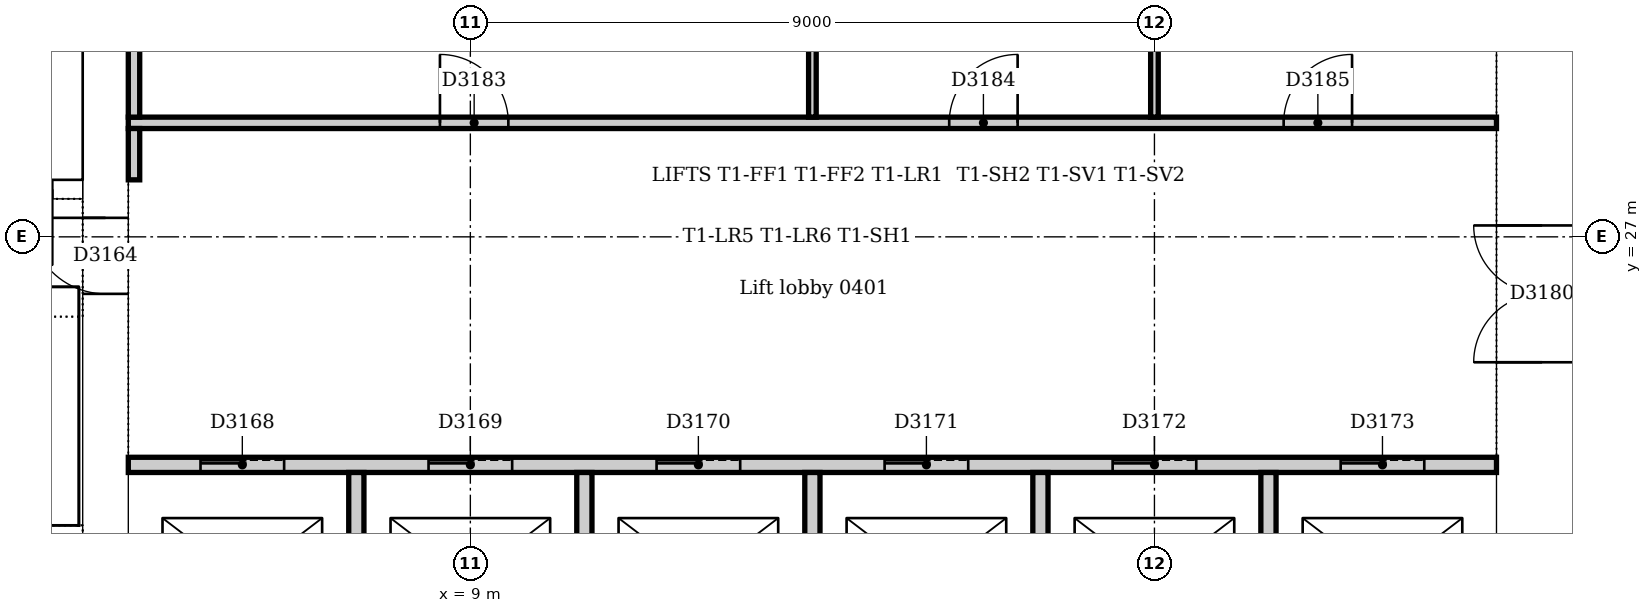
"""IFC4 building model, lengths in metres.
Left out: names, types, materials, properties, quantities, classifications, styles, units other than length and angle.
Written with IfcOpenShell. Run it as: python <this file> out.ifc"""

import sys

from ifc_helpers import new_model, si_unit, direction, frame, frame_2d, origin, place, context, subcontext, project, spatial, rectangle, extrude, element, fill, save


model = new_model("IFC4")
c1 = context("Model", 3, precision=1e-05, world=origin(), true_north=direction((0.0, 1.0)))
c2 = subcontext(c1, "Body", "Model", "MODEL_VIEW")
j1 = project(units=[si_unit("LENGTHUNIT", "METRE"), si_unit("PLANEANGLEUNIT", "RADIAN")], contexts=[c1])
p1 = place(None, origin())
s1 = spatial("IfcSite", under=j1, at=p1, CompositionType="ELEMENT")
p2 = place(p1, origin())
s2 = spatial("IfcBuilding", under=s1, at=p2, CompositionType="ELEMENT")
p3 = place(p2, frame((0.0, 0.0, 21.0)))
s3 = spatial("IfcBuildingStorey", under=s2, at=p3, CompositionType="ELEMENT", Elevation=21.0)
p4 = place(p3, frame((23.1, 21.0, 0.0), z_axis=(0.0, 0.0, 1.0), x_axis=(0.0, 1.0, 0.0)))
e1 = element("IfcWall", 1, at=p4, inside=s3, PredefinedType="SOLIDWALL", context=c2, shape_type="SweptSolid", body=[
    extrude(rectangle(XDim=10.5, YDim=1.2, at=frame_2d((5.25, 0.0))), origin(), (0.0, 0.0, 1.0), 5.0),
])
p5 = place(p4, frame((4.35, 0.0, 0.0)))
e2 = element("IfcOpeningElement", 2, at=p5, cuts=e1, PredefinedType="OPENING", context=c2, shape_type="SweptSolid", body=[
    extrude(rectangle(XDim=1.8, YDim=2.1, at=frame_2d((0.9, 1.05))), frame((0.0, 0.61, 0.0), z_axis=(0.0, -1.0, 0.0), x_axis=(1.0, 0.0, 0.0)), (0.0, 0.0, 1.0), 1.22),
])
p6 = place(p3, frame((4.2, 31.5, 0.0), z_axis=(0.0, 0.0, 1.0), x_axis=(0.0, -1.0, 0.0)))
e3 = element("IfcWall", 3, at=p6, inside=s3, PredefinedType="SOLIDWALL", context=c2, shape_type="SweptSolid", body=[
    extrude(rectangle(XDim=10.5, YDim=0.6, at=frame_2d((5.25, 0.0))), origin(), (0.0, 0.0, 1.0), 5.0),
])
p7 = place(p6, frame((4.25, 0.0, 0.0)))
e4 = element("IfcOpeningElement", 4, at=p7, cuts=e3, PredefinedType="OPENING", context=c2, shape_type="SweptSolid", body=[
    extrude(rectangle(XDim=1.0, YDim=2.1, at=frame_2d((0.5, 1.05))), frame((0.0, 0.31, 0.0), z_axis=(0.0, -1.0, 0.0), x_axis=(1.0, 0.0, 0.0)), (0.0, 0.0, 1.0), 0.62),
])
p8 = place(p3, frame((3.9, 27.625, 0.0), z_axis=(0.0, 0.0, 1.0), x_axis=(-1.0, 0.0, 0.0)))
e5 = element("IfcWall", 5, at=p8, inside=s3, PredefinedType="SOLIDWALL", context=c2, shape_type="SweptSolid", body=[
    extrude(rectangle(XDim=3.54, YDim=0.25, at=frame_2d((1.77, 0.0))), origin(), (0.0, 0.0, 1.0), 5.0),
])
p9 = place(p8, frame((0.4, 0.0, 0.0)))
e6 = element("IfcOpeningElement", 6, at=p9, cuts=e5, PredefinedType="OPENING", context=c2, shape_type="SweptSolid", body=[
    extrude(rectangle(XDim=1.0, YDim=2.1, at=frame_2d((0.5, 1.05))), frame((0.0, 0.135, 0.0), z_axis=(0.0, -1.0, 0.0), x_axis=(1.0, 0.0, 0.0)), (0.0, 0.0, 1.0), 0.27),
])
p10 = place(p3, frame((4.5, 24.0, 0.0), z_axis=(0.0, 0.0, 1.0), x_axis=(1.0, 0.0, 0.0)))
e7 = element("IfcWall", 7, at=p10, inside=s3, PredefinedType="PARTITIONING", context=c2, shape_type="SweptSolid", body=[
    extrude(rectangle(XDim=18.0, YDim=0.2, at=frame_2d((9.0, 0.0))), origin(), (0.0, 0.0, 1.0), 4.85),
])
p11 = place(p10, frame((0.95, 0.0, 0.0)))
e8 = element("IfcOpeningElement", 8, at=p11, cuts=e7, PredefinedType="OPENING", context=c2, shape_type="SweptSolid", body=[
    extrude(rectangle(XDim=1.1, YDim=2.1, at=frame_2d((0.55, 1.05))), frame((0.0, 0.11, 0.0), z_axis=(0.0, -1.0, 0.0), x_axis=(1.0, 0.0, 0.0)), (0.0, 0.0, 1.0), 0.22),
])
p12 = place(p10, frame((3.95, 0.0, 0.0)))
e9 = element("IfcOpeningElement", 9, at=p12, cuts=e7, PredefinedType="OPENING", context=c2, shape_type="SweptSolid", body=[
    extrude(rectangle(XDim=1.1, YDim=2.1, at=frame_2d((0.55, 1.05))), frame((0.0, 0.11, 0.0), z_axis=(0.0, -1.0, 0.0), x_axis=(1.0, 0.0, 0.0)), (0.0, 0.0, 1.0), 0.22),
])
p13 = place(p10, frame((6.95, 0.0, 0.0)))
e10 = element("IfcOpeningElement", 10, at=p13, cuts=e7, PredefinedType="OPENING", context=c2, shape_type="SweptSolid", body=[
    extrude(rectangle(XDim=1.1, YDim=2.1, at=frame_2d((0.55, 1.05))), frame((0.0, 0.11, 0.0), z_axis=(0.0, -1.0, 0.0), x_axis=(1.0, 0.0, 0.0)), (0.0, 0.0, 1.0), 0.22),
])
p14 = place(p10, frame((9.95, 0.0, 0.0)))
e11 = element("IfcOpeningElement", 11, at=p14, cuts=e7, PredefinedType="OPENING", context=c2, shape_type="SweptSolid", body=[
    extrude(rectangle(XDim=1.1, YDim=2.1, at=frame_2d((0.55, 1.05))), frame((0.0, 0.11, 0.0), z_axis=(0.0, -1.0, 0.0), x_axis=(1.0, 0.0, 0.0)), (0.0, 0.0, 1.0), 0.22),
])
p15 = place(p10, frame((12.95, 0.0, 0.0)))
e12 = element("IfcOpeningElement", 12, at=p15, cuts=e7, PredefinedType="OPENING", context=c2, shape_type="SweptSolid", body=[
    extrude(rectangle(XDim=1.1, YDim=2.1, at=frame_2d((0.55, 1.05))), frame((0.0, 0.11, 0.0), z_axis=(0.0, -1.0, 0.0), x_axis=(1.0, 0.0, 0.0)), (0.0, 0.0, 1.0), 0.22),
])
p16 = place(p10, frame((15.95, 0.0, 0.0)))
e13 = element("IfcOpeningElement", 13, at=p16, cuts=e7, PredefinedType="OPENING", context=c2, shape_type="SweptSolid", body=[
    extrude(rectangle(XDim=1.1, YDim=2.1, at=frame_2d((0.55, 1.05))), frame((0.0, 0.11, 0.0), z_axis=(0.0, -1.0, 0.0), x_axis=(1.0, 0.0, 0.0)), (0.0, 0.0, 1.0), 0.22),
])
for number, where, z_axis, x_axis in (
    (14, (7.5, 21.0, 0.0), (0.0, 0.0, 1.0), (0.0, 1.0, 0.0)),
    (15, (10.5, 21.0, 0.0), (0.0, 0.0, 1.0), (0.0, 1.0, 0.0)),
    (16, (13.5, 21.0, 0.0), (0.0, 0.0, 1.0), (0.0, 1.0, 0.0)),
    (17, (16.5, 21.0, 0.0), (0.0, 0.0, 1.0), (0.0, 1.0, 0.0)),
    (18, (19.5, 21.0, 0.0), (0.0, 0.0, 1.0), (0.0, 1.0, 0.0)),
):
    element("IfcWall", number, at=place(p3, frame(where, z_axis=z_axis, x_axis=x_axis)), inside=s3, PredefinedType="PARTITIONING", context=c2, shape_type="SweptSolid", body=[
        extrude(rectangle(XDim=2.9, YDim=0.2, at=frame_2d((1.45, 0.0))), origin(), (0.0, 0.0, 1.0), 4.85),
    ])
p17 = place(p3, frame((4.5, 28.5, 0.0), z_axis=(0.0, 0.0, 1.0), x_axis=(1.0, 0.0, 0.0)))
e19 = element("IfcWall", 19, at=p17, inside=s3, PredefinedType="PARTITIONING", context=c2, shape_type="SweptSolid", body=[
    extrude(rectangle(XDim=18.0, YDim=0.15, at=frame_2d((9.0, 0.0))), origin(), (0.0, 0.0, 1.0), 4.85),
])
p18 = place(p17, frame((4.1, 0.0, 0.0)))
e20 = element("IfcOpeningElement", 20, at=p18, cuts=e19, PredefinedType="OPENING", context=c2, shape_type="SweptSolid", body=[
    extrude(rectangle(XDim=0.9, YDim=2.1, at=frame_2d((0.45, 1.05))), frame((0.0, 0.085, 0.0), z_axis=(0.0, -1.0, 0.0), x_axis=(1.0, 0.0, 0.0)), (0.0, 0.0, 1.0), 0.17),
])
p19 = place(p17, frame((10.8, 0.0, 0.0)))
e21 = element("IfcOpeningElement", 21, at=p19, cuts=e19, PredefinedType="OPENING", context=c2, shape_type="SweptSolid", body=[
    extrude(rectangle(XDim=0.9, YDim=2.1, at=frame_2d((0.45, 1.05))), frame((0.0, 0.085, 0.0), z_axis=(0.0, -1.0, 0.0), x_axis=(1.0, 0.0, 0.0)), (0.0, 0.0, 1.0), 0.17),
])
p20 = place(p17, frame((15.2, 0.0, 0.0)))
e22 = element("IfcOpeningElement", 22, at=p20, cuts=e19, PredefinedType="OPENING", context=c2, shape_type="SweptSolid", body=[
    extrude(rectangle(XDim=0.9, YDim=2.1, at=frame_2d((0.45, 1.05))), frame((0.0, 0.085, 0.0), z_axis=(0.0, -1.0, 0.0), x_axis=(1.0, 0.0, 0.0)), (0.0, 0.0, 1.0), 0.17),
])
p21 = place(p3, frame((4.575, 27.75, 0.0), z_axis=(0.0, 0.0, 1.0), x_axis=(0.0, 1.0, 0.0)))
e23 = element("IfcWall", 23, at=p21, inside=s3, PredefinedType="PARTITIONING", context=c2, shape_type="SweptSolid", body=[
    extrude(rectangle(XDim=0.675, YDim=0.15, at=frame_2d((0.338, 0.0))), origin(), (0.0, 0.0, 1.0), 4.85),
])
p22 = place(p3, frame((4.575, 28.575, 0.0), z_axis=(0.0, 0.0, 1.0), x_axis=(0.0, 1.0, 0.0)))
e24 = element("IfcWall", 24, at=p22, inside=s3, PredefinedType="PARTITIONING", context=c2, shape_type="SweptSolid", body=[
    extrude(rectangle(XDim=2.675, YDim=0.15, at=frame_2d((1.337, 0.0))), origin(), (0.0, 0.0, 1.0), 4.85),
])
for number, where, z_axis, x_axis in (
    (25, (13.5, 28.575, 0.0), (0.0, 0.0, 1.0), (0.0, 1.0, 0.0)),
    (26, (18.0, 28.575, 0.0), (0.0, 0.0, 1.0), (0.0, 1.0, 0.0)),
):
    element("IfcWall", number, at=place(p3, frame(where, z_axis=z_axis, x_axis=x_axis)), inside=s3, PredefinedType="PARTITIONING", context=c2, shape_type="SweptSolid", body=[
        extrude(rectangle(XDim=2.675, YDim=0.1, at=frame_2d((1.337, 0.0))), origin(), (0.0, 0.0, 1.0), 4.85),
    ])
p23 = place(p7, frame((1.0, 0.0, 0.0), z_axis=(0.0, 0.0, 1.0), x_axis=(-1.0, 0.0, 0.0)))
e27 = element("IfcDoor", 27, at=p23, inside=s3, OperationType="SINGLE_SWING_RIGHT", PredefinedType="DOOR", context=c2, shape_type="SweptSolid", body=[
    extrude(rectangle(XDim=1.0, YDim=2.1, at=frame_2d((0.5, 1.05))), frame((0.0, 0.025, 0.0), z_axis=(0.0, -1.0, 0.0), x_axis=(1.0, 0.0, 0.0)), (0.0, 0.0, 1.0), 0.05),
])
fill(e4, e27)
p24 = place(p11, origin())
e28 = element("IfcDoor", 28, at=p24, inside=s3, OperationType="SLIDING_TO_LEFT", PredefinedType="DOOR", context=c2, shape_type="SweptSolid", body=[
    extrude(rectangle(XDim=1.1, YDim=2.1, at=frame_2d((0.55, 1.05))), frame((0.0, 0.025, 0.0), z_axis=(0.0, -1.0, 0.0), x_axis=(1.0, 0.0, 0.0)), (0.0, 0.0, 1.0), 0.05),
])
fill(e8, e28)
p25 = place(p12, origin())
e29 = element("IfcDoor", 29, at=p25, inside=s3, OperationType="SLIDING_TO_LEFT", PredefinedType="DOOR", context=c2, shape_type="SweptSolid", body=[
    extrude(rectangle(XDim=1.1, YDim=2.1, at=frame_2d((0.55, 1.05))), frame((0.0, 0.025, 0.0), z_axis=(0.0, -1.0, 0.0), x_axis=(1.0, 0.0, 0.0)), (0.0, 0.0, 1.0), 0.05),
])
fill(e9, e29)
p26 = place(p13, origin())
e30 = element("IfcDoor", 30, at=p26, inside=s3, OperationType="SLIDING_TO_LEFT", PredefinedType="DOOR", context=c2, shape_type="SweptSolid", body=[
    extrude(rectangle(XDim=1.1, YDim=2.1, at=frame_2d((0.55, 1.05))), frame((0.0, 0.025, 0.0), z_axis=(0.0, -1.0, 0.0), x_axis=(1.0, 0.0, 0.0)), (0.0, 0.0, 1.0), 0.05),
])
fill(e10, e30)
p27 = place(p14, origin())
e31 = element("IfcDoor", 31, at=p27, inside=s3, OperationType="SLIDING_TO_LEFT", PredefinedType="DOOR", context=c2, shape_type="SweptSolid", body=[
    extrude(rectangle(XDim=1.1, YDim=2.1, at=frame_2d((0.55, 1.05))), frame((0.0, 0.025, 0.0), z_axis=(0.0, -1.0, 0.0), x_axis=(1.0, 0.0, 0.0)), (0.0, 0.0, 1.0), 0.05),
])
fill(e11, e31)
p28 = place(p15, origin())
e32 = element("IfcDoor", 32, at=p28, inside=s3, OperationType="SLIDING_TO_LEFT", PredefinedType="DOOR", context=c2, shape_type="SweptSolid", body=[
    extrude(rectangle(XDim=1.1, YDim=2.1, at=frame_2d((0.55, 1.05))), frame((0.0, 0.025, 0.0), z_axis=(0.0, -1.0, 0.0), x_axis=(1.0, 0.0, 0.0)), (0.0, 0.0, 1.0), 0.05),
])
fill(e12, e32)
p29 = place(p16, origin())
e33 = element("IfcDoor", 33, at=p29, inside=s3, OperationType="SLIDING_TO_LEFT", PredefinedType="DOOR", context=c2, shape_type="SweptSolid", body=[
    extrude(rectangle(XDim=1.1, YDim=2.1, at=frame_2d((0.55, 1.05))), frame((0.0, 0.025, 0.0), z_axis=(0.0, -1.0, 0.0), x_axis=(1.0, 0.0, 0.0)), (0.0, 0.0, 1.0), 0.05),
])
fill(e13, e33)
p30 = place(p5, origin())
e34 = element("IfcDoor", 34, at=p30, inside=s3, OperationType="DOUBLE_DOOR_DOUBLE_SWING", PredefinedType="DOOR", context=c2, shape_type="SweptSolid", body=[
    extrude(rectangle(XDim=1.8, YDim=2.1, at=frame_2d((0.9, 1.05))), frame((0.0, 0.025, 0.0), z_axis=(0.0, -1.0, 0.0), x_axis=(1.0, 0.0, 0.0)), (0.0, 0.0, 1.0), 0.05),
])
fill(e2, e34)
p31 = place(p18, origin())
e35 = element("IfcDoor", 35, at=p31, inside=s3, OperationType="SINGLE_SWING_LEFT", PredefinedType="DOOR", context=c2, shape_type="SweptSolid", body=[
    extrude(rectangle(XDim=0.9, YDim=2.1, at=frame_2d((0.45, 1.05))), frame((0.0, 0.025, 0.0), z_axis=(0.0, -1.0, 0.0), x_axis=(1.0, 0.0, 0.0)), (0.0, 0.0, 1.0), 0.05),
])
fill(e20, e35)
p32 = place(p19, origin())
e36 = element("IfcDoor", 36, at=p32, inside=s3, OperationType="SINGLE_SWING_RIGHT", PredefinedType="DOOR", context=c2, shape_type="SweptSolid", body=[
    extrude(rectangle(XDim=0.9, YDim=2.1, at=frame_2d((0.45, 1.05))), frame((0.0, 0.025, 0.0), z_axis=(0.0, -1.0, 0.0), x_axis=(1.0, 0.0, 0.0)), (0.0, 0.0, 1.0), 0.05),
])
fill(e21, e36)
p33 = place(p20, origin())
e37 = element("IfcDoor", 37, at=p33, inside=s3, OperationType="SINGLE_SWING_RIGHT", PredefinedType="DOOR", context=c2, shape_type="SweptSolid", body=[
    extrude(rectangle(XDim=0.9, YDim=2.1, at=frame_2d((0.45, 1.05))), frame((0.0, 0.025, 0.0), z_axis=(0.0, -1.0, 0.0), x_axis=(1.0, 0.0, 0.0)), (0.0, 0.0, 1.0), 0.05),
])
fill(e22, e37)
save(model, sys.argv[1])
